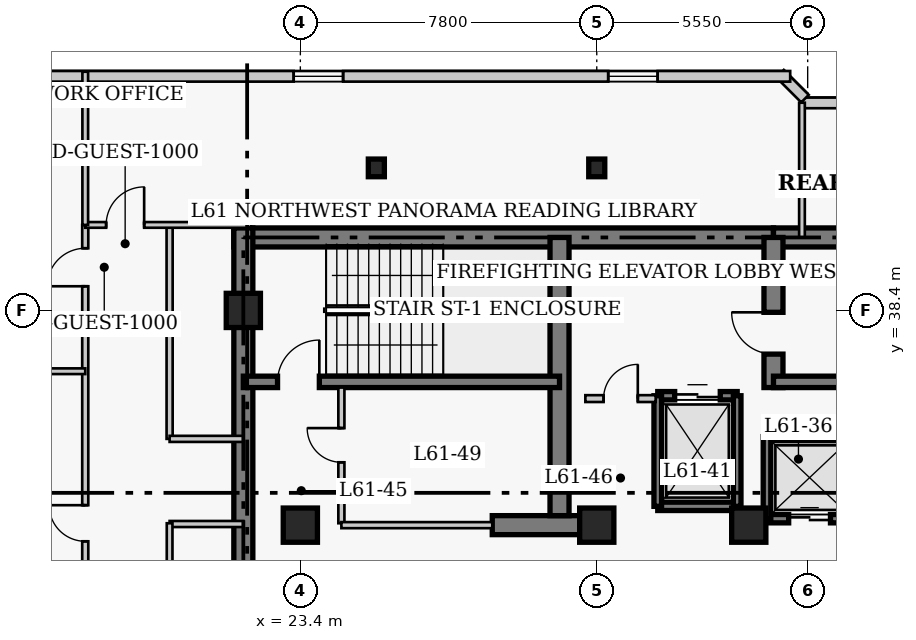
"""IFC4 building model, lengths in metres.
Left out: names, types, materials, properties, quantities, classifications, styles, units other than length and angle.
Written with IfcOpenShell. Run it as: python <this file> out.ifc"""

import sys

from ifc_helpers import new_model, si_unit, direction, frame, frame_2d, origin, origin_2d, place, context, subcontext, project, spatial, rectangle, i_section, extrude, element, fill, save


model = new_model("IFC4")
c1 = context("Model", 3, precision=1e-05, world=origin(), true_north=direction((0.0, 1.0)))
c2 = subcontext(c1, "Body", "Model", "MODEL_VIEW")
j1 = project(units=[si_unit("LENGTHUNIT", "METRE"), si_unit("PLANEANGLEUNIT", "RADIAN")], contexts=[c1])
p1 = place(None, origin())
s1 = spatial("IfcSite", under=j1, at=p1, CompositionType="ELEMENT")
p2 = place(p1, origin())
s2 = spatial("IfcBuilding", under=s1, at=p2, CompositionType="ELEMENT")
p3 = place(p2, frame((0.0, 0.0, 245.4)))
s3 = spatial("IfcBuildingStorey", under=s2, at=p3, CompositionType="ELEMENT", Elevation=245.4)
p4 = place(p3, frame((21.65, 40.32, 0.0), z_axis=(0.0, 0.0, 1.0), x_axis=(1.0, 0.0, 0.0)))
e1 = element("IfcWall", 1, at=p4, inside=s3, PredefinedType="SHEAR", context=c2, shape_type="SweptSolid", body=[
    extrude(rectangle(XDim=14.2, YDim=0.5, at=frame_2d((7.1, 0.0))), origin(), (0.0, 0.0, 1.0), 4.0),
])
p5 = place(p3, frame((35.85, 40.32, 0.0), z_axis=(0.0, 0.0, 1.0), x_axis=(1.0, 0.0, 0.0)))
e2 = element("IfcWall", 2, at=p5, inside=s3, PredefinedType="SHEAR", context=c2, shape_type="SweptSolid", body=[
    extrude(rectangle(XDim=12.6, YDim=0.5, at=frame_2d((6.3, 0.0))), origin(), (0.0, 0.0, 1.0), 4.0),
])
p6 = place(p3, frame((21.9, 27.05, 0.0), z_axis=(0.0, 0.0, 1.0), x_axis=(0.0, 1.0, 0.0)))
e3 = element("IfcWall", 3, at=p6, inside=s3, PredefinedType="SHEAR", context=c2, shape_type="SweptSolid", body=[
    extrude(rectangle(XDim=13.52, YDim=0.5, at=frame_2d((6.76, 0.0))), origin(), (0.0, 0.0, 1.0), 4.0),
])
p7 = place(p3, frame((28.45, 32.75, 0.0), z_axis=(0.0, 0.0, 1.0), x_axis=(1.0, 0.0, 0.0)))
e4 = element("IfcWall", 4, at=p7, inside=s3, PredefinedType="SHEAR", context=c2, shape_type="SweptSolid", body=[
    extrude(rectangle(XDim=2.4, YDim=0.5, at=frame_2d((1.2, 0.0))), origin(), (0.0, 0.0, 1.0), 4.0),
])
p8 = place(p3, frame((30.22, 33.0, 0.0), z_axis=(0.0, 0.0, 1.0), x_axis=(0.0, 1.0, 0.0)))
e5 = element("IfcWall", 5, at=p8, inside=s3, PredefinedType="SHEAR", context=c2, shape_type="SweptSolid", body=[
    extrude(rectangle(XDim=7.32, YDim=0.5, at=frame_2d((3.66, 0.0))), origin(), (0.0, 0.0, 1.0), 4.0),
])
p9 = place(p3, frame((35.85, 36.37, 0.0), z_axis=(0.0, 0.0, 1.0), x_axis=(0.0, 1.0, 0.0)))
e6 = element("IfcWall", 6, at=p9, inside=s3, PredefinedType="SHEAR", context=c2, shape_type="SweptSolid", body=[
    extrude(rectangle(XDim=3.95, YDim=0.5, at=frame_2d((1.975, 0.0))), origin(), (0.0, 0.0, 1.0), 4.0),
])
p10 = place(p9, frame((0.88, 0.0, 0.0)))
e7 = element("IfcOpeningElement", 7, at=p10, cuts=e6, PredefinedType="OPENING", context=c2, shape_type="SweptSolid", body=[
    extrude(rectangle(XDim=1.1, YDim=2.15, at=frame_2d((0.55, 1.075))), frame((0.0, 0.26, 0.0), z_axis=(0.0, -1.0, 0.0), x_axis=(1.0, 0.0, 0.0)), (0.0, 0.0, 1.0), 0.52),
])
p11 = place(p3, frame((21.9, 36.52, 0.0), z_axis=(0.0, 0.0, 1.0), x_axis=(1.0, 0.0, 0.0)))
e8 = element("IfcWall", 8, at=p11, inside=s3, PredefinedType="SHEAR", context=c2, shape_type="SweptSolid", body=[
    extrude(rectangle(XDim=8.32, YDim=0.3, at=frame_2d((4.16, 0.0))), origin(), (0.0, 0.0, 1.0), 4.0),
])
p12 = place(p11, frame((0.9, 0.0, 0.0)))
e9 = element("IfcOpeningElement", 9, at=p12, cuts=e8, PredefinedType="OPENING", context=c2, shape_type="SweptSolid", body=[
    extrude(rectangle(XDim=1.1, YDim=2.15, at=frame_2d((0.55, 1.075))), frame((0.0, 0.16, 0.0), z_axis=(0.0, -1.0, 0.0), x_axis=(1.0, 0.0, 0.0)), (0.0, 0.0, 1.0), 0.32),
])
p13 = place(p3, frame((35.85, 36.52, 0.0), z_axis=(0.0, 0.0, 1.0), x_axis=(1.0, 0.0, 0.0)))
e10 = element("IfcWall", 10, at=p13, inside=s3, PredefinedType="SHEAR", context=c2, shape_type="SweptSolid", body=[
    extrude(rectangle(XDim=8.33, YDim=0.3, at=frame_2d((4.165, 0.0))), origin(), (0.0, 0.0, 1.0), 4.0),
])
for number, where, z_axis, x_axis in (
    (11, (21.9, 38.4, 0.0), (0.0, 0.0, 1.0), (1.0, 0.0, 0.0)),
    (12, (23.4, 32.75, 0.0), (0.0, 0.0, 1.0), (1.0, 0.0, 0.0)),
    (13, (31.2, 32.75, 0.0), (0.0, 0.0, 1.0), (1.0, 0.0, 0.0)),
    (14, (35.2, 32.75, 0.0), (0.0, 0.0, 1.0), (1.0, 0.0, 0.0)),
):
    element("IfcColumn", number, at=place(p3, frame(where, z_axis=z_axis, x_axis=x_axis)), inside=s3, PredefinedType="COLUMN", context=c2, shape_type="SweptSolid", body=[
        extrude(rectangle(XDim=0.9, YDim=0.9, at=origin_2d()), origin(), (0.0, 0.0, 1.0), 4.0),
    ])
for number, where, z_axis, x_axis in (
    (15, (25.4, 42.15, 0.0), (0.0, 0.0, 1.0), (1.0, 0.0, 0.0)),
    (16, (31.2, 42.15, 0.0), (0.0, 0.0, 1.0), (1.0, 0.0, 0.0)),
):
    element("IfcColumn", number, at=place(p3, frame(where, z_axis=z_axis, x_axis=x_axis)), inside=s3, PredefinedType="COLUMN", context=c2, shape_type="SweptSolid", body=[
        extrude(i_section(OverallWidth=0.422, OverallDepth=0.465, WebThickness=0.045, FlangeThickness=0.073, FilletRadius=0.017, at=origin_2d()), origin(), (0.0, 0.0, 1.0), 4.0),
    ])
p14 = place(p3, frame((41.39, 43.86, 0.0), z_axis=(0.0, 0.0, 1.0), x_axis=(-1.0, 0.0, 0.0)))
e17 = element("IfcWall", 17, at=p14, inside=s3, PredefinedType="SOLIDWALL", context=c2, shape_type="SweptSolid", body=[
    extrude(rectangle(XDim=4.78, YDim=0.28, at=frame_2d((2.39, 0.0))), origin(), (0.0, 0.0, 1.0), 3.76),
])
p15 = place(p14, frame((1.74, 0.0, 0.85)))
e18 = element("IfcOpeningElement", 18, at=p15, cuts=e17, PredefinedType="OPENING", context=c2, shape_type="SweptSolid", body=[
    extrude(rectangle(XDim=1.3, YDim=1.7, at=frame_2d((0.65, 0.85))), frame((0.0, 0.15, 0.0), z_axis=(0.0, -1.0, 0.0), x_axis=(1.0, 0.0, 0.0)), (0.0, 0.0, 1.0), 0.3),
])
p16 = place(p3, frame((36.679, 43.973, 0.0), z_axis=(0.0, 0.0, 1.0), x_axis=(-0.706975312048, 0.707238225886, 0.0)))
e19 = element("IfcWall", 19, at=p16, inside=s3, PredefinedType="SOLIDWALL", context=c2, shape_type="SweptSolid", body=[
    extrude(rectangle(XDim=0.929, YDim=0.28, at=frame_2d((0.464, 0.0))), origin(), (0.0, 0.0, 1.0), 3.76),
])
p17 = place(p3, frame((36.29, 44.56, 0.0), z_axis=(0.0, 0.0, 1.0), x_axis=(-1.0, 0.0, 0.0)))
e20 = element("IfcWall", 20, at=p17, inside=s3, PredefinedType="SOLIDWALL", context=c2, shape_type="SweptSolid", body=[
    extrude(rectangle(XDim=24.83, YDim=0.28, at=frame_2d((12.415, 0.0))), origin(), (0.0, 0.0, 1.0), 3.76),
])
p18 = place(p17, frame((3.488, 0.0, 0.85)))
e21 = element("IfcOpeningElement", 21, at=p18, cuts=e20, PredefinedType="OPENING", context=c2, shape_type="SweptSolid", body=[
    extrude(rectangle(XDim=1.3, YDim=1.7, at=frame_2d((0.65, 0.85))), frame((0.0, 0.15, 0.0), z_axis=(0.0, -1.0, 0.0), x_axis=(1.0, 0.0, 0.0)), (0.0, 0.0, 1.0), 0.3),
])
p19 = place(p17, frame((11.765, 0.0, 0.85)))
e22 = element("IfcOpeningElement", 22, at=p19, cuts=e20, PredefinedType="OPENING", context=c2, shape_type="SweptSolid", body=[
    extrude(rectangle(XDim=1.3, YDim=1.7, at=frame_2d((0.65, 0.85))), frame((0.0, 0.15, 0.0), z_axis=(0.0, -1.0, 0.0), x_axis=(1.0, 0.0, 0.0)), (0.0, 0.0, 1.0), 0.3),
])
p20 = place(p17, frame((20.042, 0.0, 0.85)))
e23 = element("IfcOpeningElement", 23, at=p20, cuts=e20, PredefinedType="OPENING", context=c2, shape_type="SweptSolid", body=[
    extrude(rectangle(XDim=1.3, YDim=1.7, at=frame_2d((0.65, 0.85))), frame((0.0, 0.15, 0.0), z_axis=(0.0, -1.0, 0.0), x_axis=(1.0, 0.0, 0.0)), (0.0, 0.0, 1.0), 0.3),
])
p21 = place(p3, frame((35.68, 35.08, 0.0), z_axis=(0.0, 0.0, 1.0), x_axis=(1.0, 0.0, 0.0)))
e24 = element("IfcWall", 24, at=p21, inside=s3, PredefinedType="SHEAR", context=c2, shape_type="SweptSolid", body=[
    extrude(rectangle(XDim=2.32, YDim=0.22, at=frame_2d((1.16, 0.0))), origin(), (0.0, 0.0, 1.0), 4.0),
])
p22 = place(p3, frame((35.68, 32.92, 0.0), z_axis=(0.0, 0.0, 1.0), x_axis=(1.0, 0.0, 0.0)))
e25 = element("IfcWall", 25, at=p22, inside=s3, PredefinedType="SHEAR", context=c2, shape_type="SweptSolid", body=[
    extrude(rectangle(XDim=2.32, YDim=0.22, at=frame_2d((1.16, 0.0))), origin(), (0.0, 0.0, 1.0), 4.0),
])
p23 = place(p22, frame((0.57, 0.0, 0.0)))
e26 = element("IfcOpeningElement", 26, at=p23, cuts=e25, PredefinedType="OPENING", context=c2, shape_type="SweptSolid", body=[
    extrude(rectangle(XDim=1.1, YDim=2.15, at=frame_2d((0.55, 1.075))), frame((0.0, 0.12, 0.0), z_axis=(0.0, -1.0, 0.0), x_axis=(1.0, 0.0, 0.0)), (0.0, 0.0, 1.0), 0.24),
])
p24 = place(p3, frame((35.68, 32.92, 0.0), z_axis=(0.0, 0.0, 1.0), x_axis=(0.0, 1.0, 0.0)))
e27 = element("IfcWall", 27, at=p24, inside=s3, PredefinedType="SHEAR", context=c2, shape_type="SweptSolid", body=[
    extrude(rectangle(XDim=2.16, YDim=0.2, at=frame_2d((1.08, 0.0))), origin(), (0.0, 0.0, 1.0), 4.0),
])
p25 = place(p3, frame((32.805, 36.155, 0.0), z_axis=(0.0, 0.0, 1.0), x_axis=(1.0, 0.0, 0.0)))
e28 = element("IfcWall", 28, at=p25, inside=s3, PredefinedType="SHEAR", context=c2, shape_type="SweptSolid", body=[
    extrude(rectangle(XDim=2.09, YDim=0.22, at=frame_2d((1.045, 0.0))), origin(), (0.0, 0.0, 1.0), 4.0),
])
p26 = place(p25, frame((0.445, 0.0, 0.0)))
e29 = element("IfcOpeningElement", 29, at=p26, cuts=e28, PredefinedType="OPENING", context=c2, shape_type="SweptSolid", body=[
    extrude(rectangle(XDim=1.2, YDim=2.15, at=frame_2d((0.6, 1.075))), frame((0.0, 0.12, 0.0), z_axis=(0.0, -1.0, 0.0), x_axis=(1.0, 0.0, 0.0)), (0.0, 0.0, 1.0), 0.24),
])
p27 = place(p3, frame((32.805, 33.245, 0.0), z_axis=(0.0, 0.0, 1.0), x_axis=(1.0, 0.0, 0.0)))
e30 = element("IfcWall", 30, at=p27, inside=s3, PredefinedType="SHEAR", context=c2, shape_type="SweptSolid", body=[
    extrude(rectangle(XDim=2.09, YDim=0.22, at=frame_2d((1.045, 0.0))), origin(), (0.0, 0.0, 1.0), 4.0),
])
for number, where, z_axis, x_axis in (
    (31, (32.805, 33.245, 0.0), (0.0, 0.0, 1.0), (0.0, 1.0, 0.0)),
    (32, (34.895, 33.245, 0.0), (0.0, 0.0, 1.0), (0.0, 1.0, 0.0)),
):
    element("IfcWall", number, at=place(p3, frame(where, z_axis=z_axis, x_axis=x_axis)), inside=s3, PredefinedType="SHEAR", context=c2, shape_type="SweptSolid", body=[
        extrude(rectangle(XDim=2.91, YDim=0.2, at=frame_2d((1.455, 0.0))), origin(), (0.0, 0.0, 1.0), 4.0),
    ])
p28 = place(p3, frame((30.9, 36.08, 0.0), z_axis=(0.0, 0.0, 1.0), x_axis=(1.0, 0.0, 0.0)))
e33 = element("IfcWall", 33, at=p28, inside=s3, PredefinedType="PARTITIONING", context=c2, shape_type="SweptSolid", body=[
    extrude(rectangle(XDim=1.85, YDim=0.18, at=frame_2d((0.925, 0.0))), origin(), (0.0, 0.0, 1.0), 3.76),
])
p29 = place(p28, frame((0.48, 0.0, 0.0)))
e34 = element("IfcOpeningElement", 34, at=p29, cuts=e33, PredefinedType="OPENING", context=c2, shape_type="SweptSolid", body=[
    extrude(rectangle(XDim=0.9, YDim=2.15, at=frame_2d((0.45, 1.075))), frame((0.0, 0.1, 0.0), z_axis=(0.0, -1.0, 0.0), x_axis=(1.0, 0.0, 0.0)), (0.0, 0.0, 1.0), 0.2),
])
p30 = place(p3, frame((24.48, 32.8, 0.0), z_axis=(0.0, 0.0, 1.0), x_axis=(0.0, 1.0, 0.0)))
e35 = element("IfcWall", 35, at=p30, inside=s3, PredefinedType="PARTITIONING", context=c2, shape_type="SweptSolid", body=[
    extrude(rectangle(XDim=3.57, YDim=0.16, at=frame_2d((1.785, 0.0))), origin(), (0.0, 0.0, 1.0), 3.76),
])
p31 = place(p30, frame((1.604, 0.0, 0.0)))
e36 = element("IfcOpeningElement", 36, at=p31, cuts=e35, PredefinedType="OPENING", context=c2, shape_type="SweptSolid", body=[
    extrude(rectangle(XDim=0.9, YDim=2.1, at=frame_2d((0.45, 1.05))), frame((0.0, 0.09, 0.0), z_axis=(0.0, -1.0, 0.0), x_axis=(1.0, 0.0, 0.0)), (0.0, 0.0, 1.0), 0.18),
])
p32 = place(p3, frame((24.48, 32.75, 0.0), z_axis=(0.0, 0.0, 1.0), x_axis=(1.0, 0.0, 0.0)))
e37 = element("IfcWall", 37, at=p32, inside=s3, PredefinedType="PARTITIONING", context=c2, shape_type="SweptSolid", body=[
    extrude(rectangle(XDim=3.97, YDim=0.16, at=frame_2d((1.985, 0.0))), origin(), (0.0, 0.0, 1.0), 3.76),
])
p33 = place(p3, frame((17.74, 8.55, 0.0), z_axis=(0.0, 0.0, 1.0), x_axis=(0.0, 1.0, 0.0)))
e38 = element("IfcWall", 38, at=p33, inside=s3, PredefinedType="PARTITIONING", context=c2, shape_type="SweptSolid", body=[
    extrude(rectangle(XDim=32.1, YDim=0.16, at=frame_2d((16.05, 0.0))), origin(), (0.0, 0.0, 1.0), 3.76),
])
p34 = place(p33, frame((5.25, 0.0, 0.0)))
e39 = element("IfcOpeningElement", 39, at=p34, cuts=e38, PredefinedType="OPENING", context=c2, shape_type="SweptSolid", body=[
    extrude(rectangle(XDim=0.95, YDim=2.1, at=frame_2d((0.475, 1.05))), frame((0.0, 0.09, 0.0), z_axis=(0.0, -1.0, 0.0), x_axis=(1.0, 0.0, 0.0)), (0.0, 0.0, 1.0), 0.18),
])
p35 = place(p33, frame((15.375, 0.0, 0.0)))
e40 = element("IfcOpeningElement", 40, at=p35, cuts=e38, PredefinedType="OPENING", context=c2, shape_type="SweptSolid", body=[
    extrude(rectangle(XDim=0.95, YDim=2.1, at=frame_2d((0.475, 1.05))), frame((0.0, 0.09, 0.0), z_axis=(0.0, -1.0, 0.0), x_axis=(1.0, 0.0, 0.0)), (0.0, 0.0, 1.0), 0.18),
])
p36 = place(p33, frame((23.775, 0.0, 0.0)))
e41 = element("IfcOpeningElement", 41, at=p36, cuts=e38, PredefinedType="OPENING", context=c2, shape_type="SweptSolid", body=[
    extrude(rectangle(XDim=0.95, YDim=2.1, at=frame_2d((0.475, 1.05))), frame((0.0, 0.09, 0.0), z_axis=(0.0, -1.0, 0.0), x_axis=(1.0, 0.0, 0.0)), (0.0, 0.0, 1.0), 0.18),
])
p37 = place(p33, frame((30.486, 0.0, 0.0)))
e42 = element("IfcOpeningElement", 42, at=p37, cuts=e38, PredefinedType="OPENING", context=c2, shape_type="SweptSolid", body=[
    extrude(rectangle(XDim=1.0, YDim=2.15, at=frame_2d((0.5, 1.075))), frame((0.0, 0.09, 0.0), z_axis=(0.0, -1.0, 0.0), x_axis=(1.0, 0.0, 0.0)), (0.0, 0.0, 1.0), 0.18),
])
p38 = place(p3, frame((19.96, 35.02, 0.0), z_axis=(0.0, 0.0, 1.0), x_axis=(0.0, 1.0, 0.0)))
e43 = element("IfcWall", 43, at=p38, inside=s3, PredefinedType="PARTITIONING", context=c2, shape_type="SweptSolid", body=[
    extrude(rectangle(XDim=5.63, YDim=0.16, at=frame_2d((2.815, 0.0))), origin(), (0.0, 0.0, 1.0), 3.76),
])
for number, where, z_axis, x_axis in (
    (44, (19.96, 35.02, 0.0), (0.0, 0.0, 1.0), (1.0, 0.0, 0.0)),
    (45, (19.96, 32.78, 0.0), (0.0, 0.0, 1.0), (1.0, 0.0, 0.0)),
):
    element("IfcWall", number, at=place(p3, frame(where, z_axis=z_axis, x_axis=x_axis)), inside=s3, PredefinedType="PARTITIONING", context=c2, shape_type="SweptSolid", body=[
        extrude(rectangle(XDim=1.94, YDim=0.16, at=frame_2d((0.97, 0.0))), origin(), (0.0, 0.0, 1.0), 3.76),
    ])
p39 = place(p3, frame((17.74, 40.65, 0.0), z_axis=(0.0, 0.0, 1.0), x_axis=(1.0, 0.0, 0.0)))
e46 = element("IfcWall", 46, at=p39, inside=s3, PredefinedType="PARTITIONING", context=c2, shape_type="SweptSolid", body=[
    extrude(rectangle(XDim=4.36, YDim=0.15, at=frame_2d((2.18, 0.0))), origin(), (0.0, 0.0, 1.0), 3.76),
])
p40 = place(p39, frame((0.55, 0.0, 0.0)))
e47 = element("IfcOpeningElement", 47, at=p40, cuts=e46, PredefinedType="OPENING", context=c2, shape_type="SweptSolid", body=[
    extrude(rectangle(XDim=1.0, YDim=2.15, at=frame_2d((0.5, 1.075))), frame((0.0, 0.085, 0.0), z_axis=(0.0, -1.0, 0.0), x_axis=(1.0, 0.0, 0.0)), (0.0, 0.0, 1.0), 0.17),
])
p41 = place(p3, frame((19.96, 25.71, 0.0), z_axis=(0.0, 0.0, 1.0), x_axis=(0.0, 1.0, 0.0)))
e48 = element("IfcWall", 48, at=p41, inside=s3, PredefinedType="PARTITIONING", context=c2, shape_type="SweptSolid", body=[
    extrude(rectangle(XDim=7.09, YDim=0.15, at=frame_2d((3.545, 0.0))), origin(), (0.0, 0.0, 1.0), 3.76),
])
p42 = place(p3, frame((17.74, 40.65, 0.0), z_axis=(0.0, 0.0, 1.0), x_axis=(0.0, 1.0, 0.0)))
e49 = element("IfcWall", 49, at=p42, inside=s3, PredefinedType="PARTITIONING", context=c2, shape_type="SweptSolid", body=[
    extrude(rectangle(XDim=4.03, YDim=0.15, at=frame_2d((2.015, 0.0))), origin(), (0.0, 0.0, 1.0), 3.76),
])
p43 = place(p3, frame((36.6, 40.32, 0.0), z_axis=(0.0, 0.0, 1.0), x_axis=(0.0, 1.0, 0.0)))
e50 = element("IfcWall", 50, at=p43, inside=s3, PredefinedType="PARTITIONING", context=c2, shape_type="SweptSolid", body=[
    extrude(rectangle(XDim=3.545, YDim=0.15, at=frame_2d((1.772, 0.0))), origin(), (0.0, 0.0, 1.0), 3.76),
])
p44 = place(p3, frame((14.45, 36.8, 0.0), z_axis=(0.0, 0.0, 1.0), x_axis=(1.0, 0.0, 0.0)))
e51 = element("IfcWall", 51, at=p44, inside=s3, PredefinedType="PARTITIONING", context=c2, shape_type="SweptSolid", body=[
    extrude(rectangle(XDim=3.29, YDim=0.15, at=frame_2d((1.645, 0.0))), origin(), (0.0, 0.0, 1.0), 3.76),
])
p45 = place(p18, origin())
e52 = element("IfcWindow", 52, at=p45, inside=s3, PartitioningType="SINGLE_PANEL", PredefinedType="WINDOW", context=c2, shape_type="SweptSolid", body=[
    extrude(rectangle(XDim=1.3, YDim=1.7, at=frame_2d((0.65, 0.85))), frame((0.0, 0.03, 0.0), z_axis=(0.0, -1.0, 0.0), x_axis=(1.0, 0.0, 0.0)), (0.0, 0.0, 1.0), 0.06),
])
fill(e21, e52)
p46 = place(p19, origin())
e53 = element("IfcWindow", 53, at=p46, inside=s3, PartitioningType="SINGLE_PANEL", PredefinedType="WINDOW", context=c2, shape_type="SweptSolid", body=[
    extrude(rectangle(XDim=1.3, YDim=1.7, at=frame_2d((0.65, 0.85))), frame((0.0, 0.03, 0.0), z_axis=(0.0, -1.0, 0.0), x_axis=(1.0, 0.0, 0.0)), (0.0, 0.0, 1.0), 0.06),
])
fill(e22, e53)
p47 = place(p23, origin())
e54 = element("IfcDoor", 54, at=p47, inside=s3, OperationType="DOUBLE_DOOR_SLIDING", PredefinedType="DOOR", context=c2, shape_type="SweptSolid", body=[
    extrude(rectangle(XDim=1.1, YDim=2.15, at=frame_2d((0.55, 1.075))), frame((0.0, 0.025, 0.0), z_axis=(0.0, -1.0, 0.0), x_axis=(1.0, 0.0, 0.0)), (0.0, 0.0, 1.0), 0.05),
])
fill(e26, e54)
p48 = place(p26, origin())
e55 = element("IfcDoor", 55, at=p48, inside=s3, OperationType="DOUBLE_DOOR_SLIDING", PredefinedType="DOOR", context=c2, shape_type="SweptSolid", body=[
    extrude(rectangle(XDim=1.2, YDim=2.15, at=frame_2d((0.6, 1.075))), frame((0.0, 0.025, 0.0), z_axis=(0.0, -1.0, 0.0), x_axis=(1.0, 0.0, 0.0)), (0.0, 0.0, 1.0), 0.05),
])
fill(e29, e55)
p49 = place(p29, origin())
e56 = element("IfcDoor", 56, at=p49, inside=s3, OperationType="SINGLE_SWING_RIGHT", PredefinedType="DOOR", context=c2, shape_type="SweptSolid", body=[
    extrude(rectangle(XDim=0.9, YDim=2.15, at=frame_2d((0.45, 1.075))), frame((0.0, 0.025, 0.0), z_axis=(0.0, -1.0, 0.0), x_axis=(1.0, 0.0, 0.0)), (0.0, 0.0, 1.0), 0.05),
])
fill(e34, e56)
p50 = place(p31, origin())
e57 = element("IfcDoor", 57, at=p50, inside=s3, OperationType="SINGLE_SWING_RIGHT", PredefinedType="DOOR", context=c2, shape_type="SweptSolid", body=[
    extrude(rectangle(XDim=0.9, YDim=2.1, at=frame_2d((0.45, 1.05))), frame((0.0, 0.025, 0.0), z_axis=(0.0, -1.0, 0.0), x_axis=(1.0, 0.0, 0.0)), (0.0, 0.0, 1.0), 0.05),
])
fill(e36, e57)
p51 = place(p40, origin())
e58 = element("IfcDoor", 58, at=p51, inside=s3, OperationType="SINGLE_SWING_RIGHT", PredefinedType="DOOR", context=c2, shape_type="SweptSolid", body=[
    extrude(rectangle(XDim=1.0, YDim=2.15, at=frame_2d((0.5, 1.075))), frame((0.0, 0.025, 0.0), z_axis=(0.0, -1.0, 0.0), x_axis=(1.0, 0.0, 0.0)), (0.0, 0.0, 1.0), 0.05),
])
fill(e47, e58)
p52 = place(p36, origin())
e59 = element("IfcDoor", 59, at=p52, inside=s3, OperationType="SINGLE_SWING_RIGHT", PredefinedType="DOOR", context=c2, shape_type="SweptSolid", body=[
    extrude(rectangle(XDim=0.95, YDim=2.1, at=frame_2d((0.475, 1.05))), frame((0.0, 0.025, 0.0), z_axis=(0.0, -1.0, 0.0), x_axis=(1.0, 0.0, 0.0)), (0.0, 0.0, 1.0), 0.05),
])
fill(e41, e59)
p53 = place(p37, origin())
e60 = element("IfcDoor", 60, at=p53, inside=s3, OperationType="SINGLE_SWING_LEFT", PredefinedType="DOOR", context=c2, shape_type="SweptSolid", body=[
    extrude(rectangle(XDim=1.0, YDim=2.15, at=frame_2d((0.5, 1.075))), frame((0.0, 0.025, 0.0), z_axis=(0.0, -1.0, 0.0), x_axis=(1.0, 0.0, 0.0)), (0.0, 0.0, 1.0), 0.05),
])
fill(e42, e60)
p54 = place(p12, origin())
e61 = element("IfcDoor", 61, at=p54, inside=s3, OperationType="SINGLE_SWING_RIGHT", PredefinedType="DOOR", context=c2, shape_type="SweptSolid", body=[
    extrude(rectangle(XDim=1.1, YDim=2.15, at=frame_2d((0.55, 1.075))), frame((0.0, 0.025, 0.0), z_axis=(0.0, -1.0, 0.0), x_axis=(1.0, 0.0, 0.0)), (0.0, 0.0, 1.0), 0.05),
])
fill(e9, e61)
p55 = place(p10, origin())
e62 = element("IfcDoor", 62, at=p55, inside=s3, OperationType="SINGLE_SWING_RIGHT", PredefinedType="DOOR", context=c2, shape_type="SweptSolid", body=[
    extrude(rectangle(XDim=1.1, YDim=2.15, at=frame_2d((0.55, 1.075))), frame((0.0, 0.025, 0.0), z_axis=(0.0, -1.0, 0.0), x_axis=(1.0, 0.0, 0.0)), (0.0, 0.0, 1.0), 0.05),
])
fill(e7, e62)
save(model, sys.argv[1])
